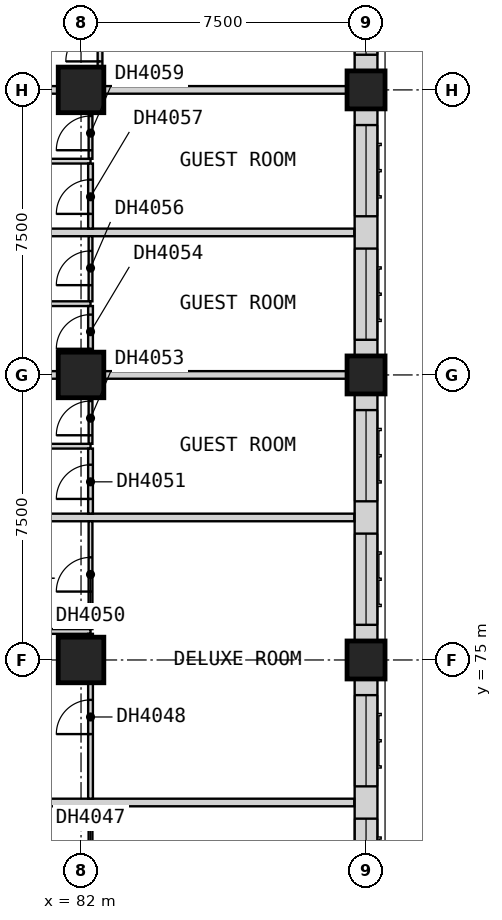
"""IFC4 building model, lengths in metres.
Left out: names, types, materials, properties, quantities, classifications, styles, units other than length and angle.
Written with IfcOpenShell. Run it as: python <this file> out.ifc"""

import sys

from ifc_helpers import new_model, si_unit, direction, frame, frame_2d, origin, origin_2d, place, context, subcontext, project, spatial, rectangle, extrude, element, fill, save


model = new_model("IFC4")
c1 = context("Model", 3, precision=1e-05, world=origin(), true_north=direction((0.0, 1.0)))
c2 = subcontext(c1, "Body", "Model", "MODEL_VIEW")
j1 = project(units=[si_unit("LENGTHUNIT", "METRE"), si_unit("PLANEANGLEUNIT", "RADIAN")], contexts=[c1])
p1 = place(None, origin())
s1 = spatial("IfcSite", under=j1, at=p1, CompositionType="ELEMENT")
p2 = place(p1, origin())
s2 = spatial("IfcBuilding", under=s1, at=p2, CompositionType="ELEMENT")
p3 = place(p2, frame((0.0, 0.0, 44.8)))
s3 = spatial("IfcBuildingStorey", under=s2, at=p3, CompositionType="ELEMENT", Elevation=44.8)
for number, where, z_axis, x_axis in (
    (1, (82.0, 75.0, 0.0), (0.0, 0.0, 1.0), (1.0, 0.0, 0.0)),
    (2, (82.0, 82.5, 0.0), (0.0, 0.0, 1.0), (1.0, 0.0, 0.0)),
    (3, (82.0, 90.0, 0.0), (0.0, 0.0, 1.0), (1.0, 0.0, 0.0)),
):
    element("IfcColumn", number, at=place(p3, frame(where, z_axis=z_axis, x_axis=x_axis)), inside=s3, PredefinedType="COLUMN", context=c2, shape_type="SweptSolid", body=[
        extrude(rectangle(XDim=1.2, YDim=1.2, at=origin_2d()), origin(), (0.0, 0.0, 1.0), 3.6),
    ])
for number, where, z_axis, x_axis in (
    (4, (89.5, 75.0, 0.0), (0.0, 0.0, 1.0), (1.0, 0.0, 0.0)),
    (5, (89.5, 82.5, 0.0), (0.0, 0.0, 1.0), (1.0, 0.0, 0.0)),
    (6, (89.5, 90.0, 0.0), (0.0, 0.0, 1.0), (1.0, 0.0, 0.0)),
):
    element("IfcColumn", number, at=place(p3, frame(where, z_axis=z_axis, x_axis=x_axis)), inside=s3, PredefinedType="COLUMN", context=c2, shape_type="SweptSolid", body=[
        extrude(rectangle(XDim=1.0, YDim=1.0, at=origin_2d()), origin(), (0.0, 0.0, 1.0), 3.6),
    ])
p4 = place(p3, frame((89.5, 68.0, 0.0), z_axis=(0.0, 0.0, 1.0), x_axis=(0.0, 1.0, 0.0)))
e7 = element("IfcWall", 7, at=p4, inside=s3, PredefinedType="SOLIDWALL", context=c2, shape_type="SweptSolid", body=[
    extrude(rectangle(XDim=6.5, YDim=0.6, at=frame_2d((3.25, 0.0))), origin(), (0.0, 0.0, 1.0), 2.85),
])
p5 = place(p4, frame((0.425, 0.0, 0.8)))
e8 = element("IfcOpeningElement", 8, at=p5, cuts=e7, PredefinedType="OPENING", context=c2, shape_type="SweptSolid", body=[
    extrude(rectangle(XDim=2.4, YDim=1.8, at=frame_2d((1.2, 0.9))), frame((0.0, 0.31, 0.0), z_axis=(0.0, -1.0, 0.0), x_axis=(1.0, 0.0, 0.0)), (0.0, 0.0, 1.0), 0.62),
])
p6 = place(p4, frame((3.675, 0.0, 0.8)))
e9 = element("IfcOpeningElement", 9, at=p6, cuts=e7, PredefinedType="OPENING", context=c2, shape_type="SweptSolid", body=[
    extrude(rectangle(XDim=2.4, YDim=1.8, at=frame_2d((1.2, 0.9))), frame((0.0, 0.31, 0.0), z_axis=(0.0, -1.0, 0.0), x_axis=(1.0, 0.0, 0.0)), (0.0, 0.0, 1.0), 0.62),
])
p7 = place(p3, frame((89.5, 75.5, 0.0), z_axis=(0.0, 0.0, 1.0), x_axis=(0.0, 1.0, 0.0)))
e10 = element("IfcWall", 10, at=p7, inside=s3, PredefinedType="SOLIDWALL", context=c2, shape_type="SweptSolid", body=[
    extrude(rectangle(XDim=6.5, YDim=0.6, at=frame_2d((3.25, 0.0))), origin(), (0.0, 0.0, 1.0), 2.85),
])
p8 = place(p7, frame((0.425, 0.0, 0.8)))
e11 = element("IfcOpeningElement", 11, at=p8, cuts=e10, PredefinedType="OPENING", context=c2, shape_type="SweptSolid", body=[
    extrude(rectangle(XDim=2.4, YDim=1.8, at=frame_2d((1.2, 0.9))), frame((0.0, 0.31, 0.0), z_axis=(0.0, -1.0, 0.0), x_axis=(1.0, 0.0, 0.0)), (0.0, 0.0, 1.0), 0.62),
])
p9 = place(p7, frame((3.675, 0.0, 0.8)))
e12 = element("IfcOpeningElement", 12, at=p9, cuts=e10, PredefinedType="OPENING", context=c2, shape_type="SweptSolid", body=[
    extrude(rectangle(XDim=2.4, YDim=1.8, at=frame_2d((1.2, 0.9))), frame((0.0, 0.31, 0.0), z_axis=(0.0, -1.0, 0.0), x_axis=(1.0, 0.0, 0.0)), (0.0, 0.0, 1.0), 0.62),
])
p10 = place(p3, frame((89.5, 83.0, 0.0), z_axis=(0.0, 0.0, 1.0), x_axis=(0.0, 1.0, 0.0)))
e13 = element("IfcWall", 13, at=p10, inside=s3, PredefinedType="SOLIDWALL", context=c2, shape_type="SweptSolid", body=[
    extrude(rectangle(XDim=6.5, YDim=0.6, at=frame_2d((3.25, 0.0))), origin(), (0.0, 0.0, 1.0), 2.85),
])
p11 = place(p10, frame((0.425, 0.0, 0.8)))
e14 = element("IfcOpeningElement", 14, at=p11, cuts=e13, PredefinedType="OPENING", context=c2, shape_type="SweptSolid", body=[
    extrude(rectangle(XDim=2.4, YDim=1.8, at=frame_2d((1.2, 0.9))), frame((0.0, 0.31, 0.0), z_axis=(0.0, -1.0, 0.0), x_axis=(1.0, 0.0, 0.0)), (0.0, 0.0, 1.0), 0.62),
])
p12 = place(p10, frame((3.675, 0.0, 0.8)))
e15 = element("IfcOpeningElement", 15, at=p12, cuts=e13, PredefinedType="OPENING", context=c2, shape_type="SweptSolid", body=[
    extrude(rectangle(XDim=2.4, YDim=1.8, at=frame_2d((1.2, 0.9))), frame((0.0, 0.31, 0.0), z_axis=(0.0, -1.0, 0.0), x_axis=(1.0, 0.0, 0.0)), (0.0, 0.0, 1.0), 0.62),
])
p13 = place(p3, frame((89.5, 90.5, 0.0), z_axis=(0.0, 0.0, 1.0), x_axis=(0.0, 1.0, 0.0)))
e16 = element("IfcWall", 16, at=p13, inside=s3, PredefinedType="SOLIDWALL", context=c2, shape_type="SweptSolid", body=[
    extrude(rectangle(XDim=6.0, YDim=0.6, at=frame_2d((3.0, 0.0))), origin(), (0.0, 0.0, 1.0), 2.85),
])
p14 = place(p13, frame((0.425, 0.0, 0.8)))
e17 = element("IfcOpeningElement", 17, at=p14, cuts=e16, PredefinedType="OPENING", context=c2, shape_type="SweptSolid", body=[
    extrude(rectangle(XDim=2.4, YDim=1.8, at=frame_2d((1.2, 0.9))), frame((0.0, 0.31, 0.0), z_axis=(0.0, -1.0, 0.0), x_axis=(1.0, 0.0, 0.0)), (0.0, 0.0, 1.0), 0.62),
])
p15 = place(p13, frame((3.425, 0.0, 0.8)))
e18 = element("IfcOpeningElement", 18, at=p15, cuts=e16, PredefinedType="OPENING", context=c2, shape_type="SweptSolid", body=[
    extrude(rectangle(XDim=2.4, YDim=1.8, at=frame_2d((1.2, 0.9))), frame((0.0, 0.31, 0.0), z_axis=(0.0, -1.0, 0.0), x_axis=(1.0, 0.0, 0.0)), (0.0, 0.0, 1.0), 0.62),
])
for number, where, z_axis, x_axis in (
    (19, (77.475, 71.25, 0.0), (0.0, 0.0, 1.0), (1.0, 0.0, 0.0)),
    (20, (77.475, 78.75, 0.0), (0.0, 0.0, 1.0), (1.0, 0.0, 0.0)),
):
    element("IfcWall", number, at=place(p3, frame(where, z_axis=z_axis, x_axis=x_axis)), inside=s3, PredefinedType="PARTITIONING", context=c2, shape_type="SweptSolid", body=[
        extrude(rectangle(XDim=11.715, YDim=0.2, at=frame_2d((5.857, 0.0))), origin(), (0.0, 0.0, 1.0), 3.35),
    ])
p16 = place(p3, frame((77.475, 82.5, 0.0), z_axis=(0.0, 0.0, 1.0), x_axis=(1.0, 0.0, 0.0)))
e21 = element("IfcWall", 21, at=p16, inside=s3, PredefinedType="PARTITIONING", context=c2, shape_type="SweptSolid", body=[
    extrude(rectangle(XDim=12.525, YDim=0.2, at=frame_2d((6.262, 0.0))), origin(), (0.0, 0.0, 1.0), 3.35),
])
p17 = place(p3, frame((77.475, 86.25, 0.0), z_axis=(0.0, 0.0, 1.0), x_axis=(1.0, 0.0, 0.0)))
e22 = element("IfcWall", 22, at=p17, inside=s3, PredefinedType="PARTITIONING", context=c2, shape_type="SweptSolid", body=[
    extrude(rectangle(XDim=11.715, YDim=0.2, at=frame_2d((5.857, 0.0))), origin(), (0.0, 0.0, 1.0), 3.35),
])
p18 = place(p3, frame((77.475, 90.0, 0.0), z_axis=(0.0, 0.0, 1.0), x_axis=(1.0, 0.0, 0.0)))
e23 = element("IfcWall", 23, at=p18, inside=s3, PredefinedType="PARTITIONING", context=c2, shape_type="SweptSolid", body=[
    extrude(rectangle(XDim=12.525, YDim=0.2, at=frame_2d((6.262, 0.0))), origin(), (0.0, 0.0, 1.0), 3.35),
])
p19 = place(p3, frame((82.25, 68.312, 0.0), z_axis=(0.0, 0.0, 1.0), x_axis=(0.0, 1.0, 0.0)))
e24 = element("IfcWall", 24, at=p19, inside=s3, PredefinedType="PARTITIONING", context=c2, shape_type="SweptSolid", body=[
    extrude(rectangle(XDim=2.837, YDim=0.1, at=frame_2d((1.419, 0.0))), origin(), (0.0, 0.0, 1.0), 3.35),
])
p20 = place(p19, frame((0.988, 0.0, 0.0)))
e25 = element("IfcOpeningElement", 25, at=p20, cuts=e24, PredefinedType="OPENING", context=c2, shape_type="SweptSolid", body=[
    extrude(rectangle(XDim=0.9, YDim=2.1, at=frame_2d((0.45, 1.05))), frame((0.0, 0.06, 0.0), z_axis=(0.0, -1.0, 0.0), x_axis=(1.0, 0.0, 0.0)), (0.0, 0.0, 1.0), 0.12),
])
p21 = place(p3, frame((82.25, 75.812, 0.0), z_axis=(0.0, 0.0, 1.0), x_axis=(0.0, 1.0, 0.0)))
e26 = element("IfcWall", 26, at=p21, inside=s3, PredefinedType="PARTITIONING", context=c2, shape_type="SweptSolid", body=[
    extrude(rectangle(XDim=2.837, YDim=0.1, at=frame_2d((1.419, 0.0))), origin(), (0.0, 0.0, 1.0), 3.35),
])
p22 = place(p21, frame((0.988, 0.0, 0.0)))
e27 = element("IfcOpeningElement", 27, at=p22, cuts=e26, PredefinedType="OPENING", context=c2, shape_type="SweptSolid", body=[
    extrude(rectangle(XDim=0.9, YDim=2.1, at=frame_2d((0.45, 1.05))), frame((0.0, 0.06, 0.0), z_axis=(0.0, -1.0, 0.0), x_axis=(1.0, 0.0, 0.0)), (0.0, 0.0, 1.0), 0.12),
])
p23 = place(p3, frame((82.25, 80.688, 0.0), z_axis=(0.0, 0.0, 1.0), x_axis=(0.0, 1.0, 0.0)))
e28 = element("IfcWall", 28, at=p23, inside=s3, PredefinedType="PARTITIONING", context=c2, shape_type="SweptSolid", body=[
    extrude(rectangle(XDim=1.712, YDim=0.1, at=frame_2d((0.856, 0.0))), origin(), (0.0, 0.0, 1.0), 3.35),
])
p24 = place(p23, frame((0.225, 0.0, 0.0)))
e29 = element("IfcOpeningElement", 29, at=p24, cuts=e28, PredefinedType="OPENING", context=c2, shape_type="SweptSolid", body=[
    extrude(rectangle(XDim=0.9, YDim=2.1, at=frame_2d((0.45, 1.05))), frame((0.0, 0.06, 0.0), z_axis=(0.0, -1.0, 0.0), x_axis=(1.0, 0.0, 0.0)), (0.0, 0.0, 1.0), 0.12),
])
p25 = place(p3, frame((82.25, 84.438, 0.0), z_axis=(0.0, 0.0, 1.0), x_axis=(0.0, 1.0, 0.0)))
e30 = element("IfcWall", 30, at=p25, inside=s3, PredefinedType="PARTITIONING", context=c2, shape_type="SweptSolid", body=[
    extrude(rectangle(XDim=1.712, YDim=0.1, at=frame_2d((0.856, 0.0))), origin(), (0.0, 0.0, 1.0), 3.35),
])
p26 = place(p25, frame((0.425, 0.0, 0.0)))
e31 = element("IfcOpeningElement", 31, at=p26, cuts=e30, PredefinedType="OPENING", context=c2, shape_type="SweptSolid", body=[
    extrude(rectangle(XDim=0.9, YDim=2.1, at=frame_2d((0.45, 1.05))), frame((0.0, 0.06, 0.0), z_axis=(0.0, -1.0, 0.0), x_axis=(1.0, 0.0, 0.0)), (0.0, 0.0, 1.0), 0.12),
])
p27 = place(p3, frame((82.25, 88.188, 0.0), z_axis=(0.0, 0.0, 1.0), x_axis=(0.0, 1.0, 0.0)))
e32 = element("IfcWall", 32, at=p27, inside=s3, PredefinedType="PARTITIONING", context=c2, shape_type="SweptSolid", body=[
    extrude(rectangle(XDim=1.712, YDim=0.1, at=frame_2d((0.856, 0.0))), origin(), (0.0, 0.0, 1.0), 3.35),
])
p28 = place(p27, frame((0.225, 0.0, 0.0)))
e33 = element("IfcOpeningElement", 33, at=p28, cuts=e32, PredefinedType="OPENING", context=c2, shape_type="SweptSolid", body=[
    extrude(rectangle(XDim=0.9, YDim=2.1, at=frame_2d((0.45, 1.05))), frame((0.0, 0.06, 0.0), z_axis=(0.0, -1.0, 0.0), x_axis=(1.0, 0.0, 0.0)), (0.0, 0.0, 1.0), 0.12),
])
for number, where, z_axis, x_axis in (
    (34, (77.475, 75.75, 0.0), (0.0, 0.0, 1.0), (1.0, 0.0, 0.0)),
    (35, (77.475, 80.625, 0.0), (0.0, 0.0, 1.0), (1.0, 0.0, 0.0)),
    (36, (77.475, 84.375, 0.0), (0.0, 0.0, 1.0), (1.0, 0.0, 0.0)),
    (37, (77.475, 88.125, 0.0), (0.0, 0.0, 1.0), (1.0, 0.0, 0.0)),
):
    element("IfcWall", number, at=place(p3, frame(where, z_axis=z_axis, x_axis=x_axis)), inside=s3, PredefinedType="PARTITIONING", context=c2, shape_type="SweptSolid", body=[
        extrude(rectangle(XDim=4.775, YDim=0.125, at=frame_2d((2.387, 0.0))), origin(), (0.0, 0.0, 1.0), 3.35),
    ])
p29 = place(p3, frame((82.25, 71.35, 0.0), z_axis=(0.0, 0.0, 1.0), x_axis=(0.0, 1.0, 0.0)))
e38 = element("IfcWall", 38, at=p29, inside=s3, PredefinedType="PARTITIONING", context=c2, shape_type="SweptSolid", body=[
    extrude(rectangle(XDim=4.337, YDim=0.125, at=frame_2d((2.169, 0.0))), origin(), (0.0, 0.0, 1.0), 3.35),
])
p30 = place(p29, frame((1.7, 0.0, 0.0)))
e39 = element("IfcOpeningElement", 39, at=p30, cuts=e38, PredefinedType="OPENING", context=c2, shape_type="SweptSolid", body=[
    extrude(rectangle(XDim=0.9, YDim=2.1, at=frame_2d((0.45, 1.05))), frame((0.0, 0.073, 0.0), z_axis=(0.0, -1.0, 0.0), x_axis=(1.0, 0.0, 0.0)), (0.0, 0.0, 1.0), 0.145),
])
p31 = place(p3, frame((82.25, 78.85, 0.0), z_axis=(0.0, 0.0, 1.0), x_axis=(0.0, 1.0, 0.0)))
e40 = element("IfcWall", 40, at=p31, inside=s3, PredefinedType="PARTITIONING", context=c2, shape_type="SweptSolid", body=[
    extrude(rectangle(XDim=1.712, YDim=0.125, at=frame_2d((0.856, 0.0))), origin(), (0.0, 0.0, 1.0), 3.35),
])
p32 = place(p31, frame((0.387, 0.0, 0.0)))
e41 = element("IfcOpeningElement", 41, at=p32, cuts=e40, PredefinedType="OPENING", context=c2, shape_type="SweptSolid", body=[
    extrude(rectangle(XDim=0.9, YDim=2.1, at=frame_2d((0.45, 1.05))), frame((0.0, 0.073, 0.0), z_axis=(0.0, -1.0, 0.0), x_axis=(1.0, 0.0, 0.0)), (0.0, 0.0, 1.0), 0.145),
])
p33 = place(p3, frame((82.25, 82.6, 0.0), z_axis=(0.0, 0.0, 1.0), x_axis=(0.0, 1.0, 0.0)))
e42 = element("IfcWall", 42, at=p33, inside=s3, PredefinedType="PARTITIONING", context=c2, shape_type="SweptSolid", body=[
    extrude(rectangle(XDim=1.712, YDim=0.125, at=frame_2d((0.856, 0.0))), origin(), (0.0, 0.0, 1.0), 3.35),
])
p34 = place(p33, frame((0.587, 0.0, 0.0)))
e43 = element("IfcOpeningElement", 43, at=p34, cuts=e42, PredefinedType="OPENING", context=c2, shape_type="SweptSolid", body=[
    extrude(rectangle(XDim=0.9, YDim=2.1, at=frame_2d((0.45, 1.05))), frame((0.0, 0.073, 0.0), z_axis=(0.0, -1.0, 0.0), x_axis=(1.0, 0.0, 0.0)), (0.0, 0.0, 1.0), 0.145),
])
p35 = place(p3, frame((82.25, 86.35, 0.0), z_axis=(0.0, 0.0, 1.0), x_axis=(0.0, 1.0, 0.0)))
e44 = element("IfcWall", 44, at=p35, inside=s3, PredefinedType="PARTITIONING", context=c2, shape_type="SweptSolid", body=[
    extrude(rectangle(XDim=1.712, YDim=0.125, at=frame_2d((0.856, 0.0))), origin(), (0.0, 0.0, 1.0), 3.35),
])
p36 = place(p35, frame((0.387, 0.0, 0.0)))
e45 = element("IfcOpeningElement", 45, at=p36, cuts=e44, PredefinedType="OPENING", context=c2, shape_type="SweptSolid", body=[
    extrude(rectangle(XDim=0.9, YDim=2.1, at=frame_2d((0.45, 1.05))), frame((0.0, 0.073, 0.0), z_axis=(0.0, -1.0, 0.0), x_axis=(1.0, 0.0, 0.0)), (0.0, 0.0, 1.0), 0.145),
])
p37 = place(p3, frame((82.5, 90.1, 0.0), z_axis=(0.0, 0.0, 1.0), x_axis=(0.0, 1.0, 0.0)))
e46 = element("IfcWall", 46, at=p37, inside=s3, PredefinedType="PARTITIONING", context=c2, shape_type="SweptSolid", body=[
    extrude(rectangle(XDim=2.237, YDim=0.125, at=frame_2d((1.119, 0.0))), origin(), (0.0, 0.0, 1.0), 3.35),
])
p38 = place(p37, frame((0.65, 0.0, 0.0)))
e47 = element("IfcOpeningElement", 47, at=p38, cuts=e46, PredefinedType="OPENING", context=c2, shape_type="SweptSolid", body=[
    extrude(rectangle(XDim=0.9, YDim=2.1, at=frame_2d((0.45, 1.05))), frame((0.0, 0.073, 0.0), z_axis=(0.0, -1.0, 0.0), x_axis=(1.0, 0.0, 0.0)), (0.0, 0.0, 1.0), 0.145),
])
p39 = place(p5, origin())
e48 = element("IfcWindow", 48, at=p39, inside=s3, PartitioningType="SINGLE_PANEL", PredefinedType="WINDOW", context=c2, shape_type="SweptSolid", body=[
    extrude(rectangle(XDim=2.4, YDim=1.8, at=frame_2d((1.2, 0.9))), frame((0.0, -0.07, 0.0), z_axis=(0.0, -1.0, 0.0), x_axis=(1.0, 0.0, 0.0)), (0.0, 0.0, 1.0), 0.06),
])
fill(e8, e48)
p40 = place(p6, origin())
e49 = element("IfcWindow", 49, at=p40, inside=s3, PartitioningType="SINGLE_PANEL", PredefinedType="WINDOW", context=c2, shape_type="SweptSolid", body=[
    extrude(rectangle(XDim=2.4, YDim=1.8, at=frame_2d((1.2, 0.9))), frame((0.0, -0.07, 0.0), z_axis=(0.0, -1.0, 0.0), x_axis=(1.0, 0.0, 0.0)), (0.0, 0.0, 1.0), 0.06),
])
fill(e9, e49)
p41 = place(p8, origin())
e50 = element("IfcWindow", 50, at=p41, inside=s3, PartitioningType="SINGLE_PANEL", PredefinedType="WINDOW", context=c2, shape_type="SweptSolid", body=[
    extrude(rectangle(XDim=2.4, YDim=1.8, at=frame_2d((1.2, 0.9))), frame((0.0, -0.07, 0.0), z_axis=(0.0, -1.0, 0.0), x_axis=(1.0, 0.0, 0.0)), (0.0, 0.0, 1.0), 0.06),
])
fill(e11, e50)
p42 = place(p9, origin())
e51 = element("IfcWindow", 51, at=p42, inside=s3, PartitioningType="SINGLE_PANEL", PredefinedType="WINDOW", context=c2, shape_type="SweptSolid", body=[
    extrude(rectangle(XDim=2.4, YDim=1.8, at=frame_2d((1.2, 0.9))), frame((0.0, -0.07, 0.0), z_axis=(0.0, -1.0, 0.0), x_axis=(1.0, 0.0, 0.0)), (0.0, 0.0, 1.0), 0.06),
])
fill(e12, e51)
p43 = place(p11, origin())
e52 = element("IfcWindow", 52, at=p43, inside=s3, PartitioningType="SINGLE_PANEL", PredefinedType="WINDOW", context=c2, shape_type="SweptSolid", body=[
    extrude(rectangle(XDim=2.4, YDim=1.8, at=frame_2d((1.2, 0.9))), frame((0.0, -0.07, 0.0), z_axis=(0.0, -1.0, 0.0), x_axis=(1.0, 0.0, 0.0)), (0.0, 0.0, 1.0), 0.06),
])
fill(e14, e52)
p44 = place(p12, origin())
e53 = element("IfcWindow", 53, at=p44, inside=s3, PartitioningType="SINGLE_PANEL", PredefinedType="WINDOW", context=c2, shape_type="SweptSolid", body=[
    extrude(rectangle(XDim=2.4, YDim=1.8, at=frame_2d((1.2, 0.9))), frame((0.0, -0.07, 0.0), z_axis=(0.0, -1.0, 0.0), x_axis=(1.0, 0.0, 0.0)), (0.0, 0.0, 1.0), 0.06),
])
fill(e15, e53)
p45 = place(p14, origin())
e54 = element("IfcWindow", 54, at=p45, inside=s3, PartitioningType="SINGLE_PANEL", PredefinedType="WINDOW", context=c2, shape_type="SweptSolid", body=[
    extrude(rectangle(XDim=2.4, YDim=1.8, at=frame_2d((1.2, 0.9))), frame((0.0, -0.07, 0.0), z_axis=(0.0, -1.0, 0.0), x_axis=(1.0, 0.0, 0.0)), (0.0, 0.0, 1.0), 0.06),
])
fill(e17, e54)
p46 = place(p30, origin())
e55 = element("IfcDoor", 55, at=p46, inside=s3, OperationType="SINGLE_SWING_LEFT", PredefinedType="DOOR", context=c2, shape_type="SweptSolid", body=[
    extrude(rectangle(XDim=0.9, YDim=2.1, at=frame_2d((0.45, 1.05))), frame((0.0, 0.025, 0.0), z_axis=(0.0, -1.0, 0.0), x_axis=(1.0, 0.0, 0.0)), (0.0, 0.0, 1.0), 0.05),
])
fill(e39, e55)
p47 = place(p22, origin())
e56 = element("IfcDoor", 56, at=p47, inside=s3, OperationType="SINGLE_SWING_LEFT", PredefinedType="DOOR", context=c2, shape_type="SweptSolid", body=[
    extrude(rectangle(XDim=0.9, YDim=2.1, at=frame_2d((0.45, 1.05))), frame((0.0, 0.025, 0.0), z_axis=(0.0, -1.0, 0.0), x_axis=(1.0, 0.0, 0.0)), (0.0, 0.0, 1.0), 0.05),
])
fill(e27, e56)
p48 = place(p32, origin())
e57 = element("IfcDoor", 57, at=p48, inside=s3, OperationType="SINGLE_SWING_LEFT", PredefinedType="DOOR", context=c2, shape_type="SweptSolid", body=[
    extrude(rectangle(XDim=0.9, YDim=2.1, at=frame_2d((0.45, 1.05))), frame((0.0, 0.025, 0.0), z_axis=(0.0, -1.0, 0.0), x_axis=(1.0, 0.0, 0.0)), (0.0, 0.0, 1.0), 0.05),
])
fill(e41, e57)
p49 = place(p24, origin())
e58 = element("IfcDoor", 58, at=p49, inside=s3, OperationType="SINGLE_SWING_LEFT", PredefinedType="DOOR", context=c2, shape_type="SweptSolid", body=[
    extrude(rectangle(XDim=0.9, YDim=2.1, at=frame_2d((0.45, 1.05))), frame((0.0, 0.025, 0.0), z_axis=(0.0, -1.0, 0.0), x_axis=(1.0, 0.0, 0.0)), (0.0, 0.0, 1.0), 0.05),
])
fill(e29, e58)
p50 = place(p34, origin())
e59 = element("IfcDoor", 59, at=p50, inside=s3, OperationType="SINGLE_SWING_RIGHT", PredefinedType="DOOR", context=c2, shape_type="SweptSolid", body=[
    extrude(rectangle(XDim=0.9, YDim=2.1, at=frame_2d((0.45, 1.05))), frame((0.0, 0.025, 0.0), z_axis=(0.0, -1.0, 0.0), x_axis=(1.0, 0.0, 0.0)), (0.0, 0.0, 1.0), 0.05),
])
fill(e43, e59)
p51 = place(p26, origin())
e60 = element("IfcDoor", 60, at=p51, inside=s3, OperationType="SINGLE_SWING_LEFT", PredefinedType="DOOR", context=c2, shape_type="SweptSolid", body=[
    extrude(rectangle(XDim=0.9, YDim=2.1, at=frame_2d((0.45, 1.05))), frame((0.0, 0.025, 0.0), z_axis=(0.0, -1.0, 0.0), x_axis=(1.0, 0.0, 0.0)), (0.0, 0.0, 1.0), 0.05),
])
fill(e31, e60)
p52 = place(p36, origin())
e61 = element("IfcDoor", 61, at=p52, inside=s3, OperationType="SINGLE_SWING_LEFT", PredefinedType="DOOR", context=c2, shape_type="SweptSolid", body=[
    extrude(rectangle(XDim=0.9, YDim=2.1, at=frame_2d((0.45, 1.05))), frame((0.0, 0.025, 0.0), z_axis=(0.0, -1.0, 0.0), x_axis=(1.0, 0.0, 0.0)), (0.0, 0.0, 1.0), 0.05),
])
fill(e45, e61)
p53 = place(p28, origin())
e62 = element("IfcDoor", 62, at=p53, inside=s3, OperationType="SINGLE_SWING_LEFT", PredefinedType="DOOR", context=c2, shape_type="SweptSolid", body=[
    extrude(rectangle(XDim=0.9, YDim=2.1, at=frame_2d((0.45, 1.05))), frame((0.0, 0.025, 0.0), z_axis=(0.0, -1.0, 0.0), x_axis=(1.0, 0.0, 0.0)), (0.0, 0.0, 1.0), 0.05),
])
fill(e33, e62)
p54 = place(p38, origin())
e63 = element("IfcDoor", 63, at=p54, inside=s3, OperationType="SINGLE_SWING_LEFT", PredefinedType="DOOR", context=c2, shape_type="SweptSolid", body=[
    extrude(rectangle(XDim=0.9, YDim=2.1, at=frame_2d((0.45, 1.05))), frame((0.0, 0.025, 0.0), z_axis=(0.0, -1.0, 0.0), x_axis=(1.0, 0.0, 0.0)), (0.0, 0.0, 1.0), 0.05),
])
fill(e47, e63)
save(model, sys.argv[1])
